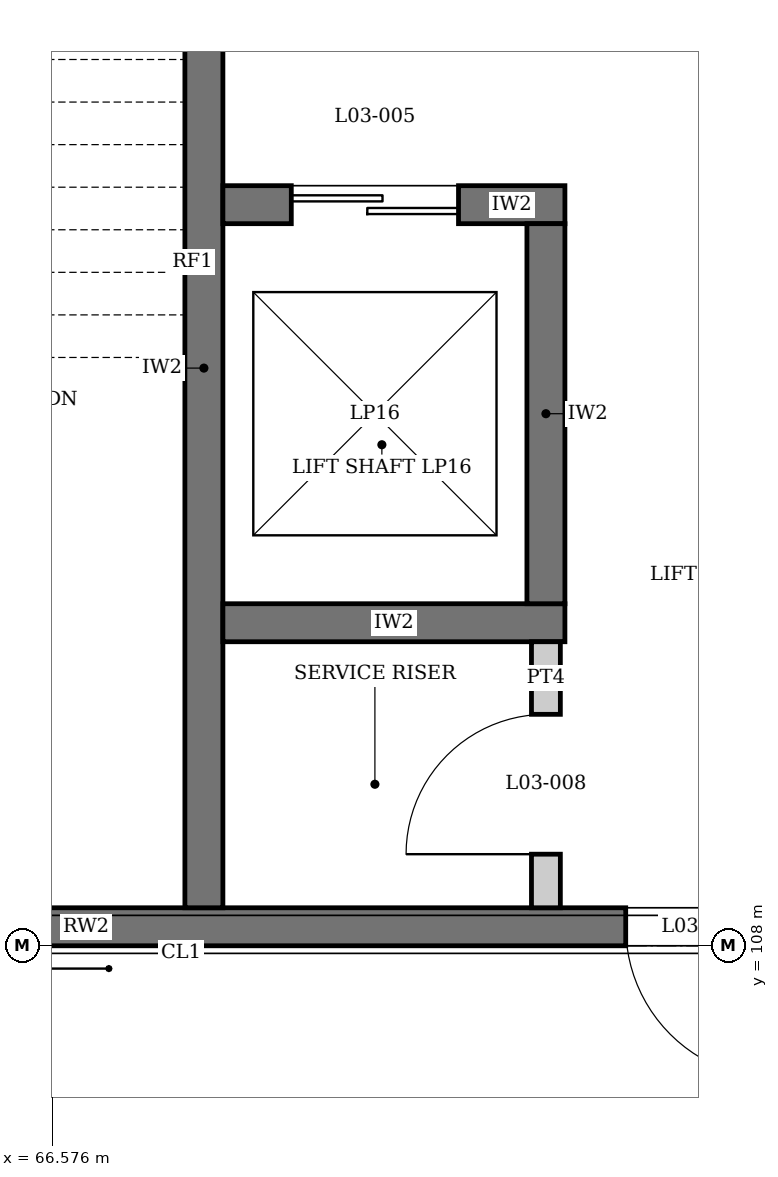
"""IFC4 building model, lengths in metres.
Left out: names, types, materials, properties, quantities, classifications, styles, units other than length and angle.
Written with IfcOpenShell. Run it as: python <this file> out.ifc"""

import sys

from ifc_helpers import new_model, si_unit, direction, frame, frame_2d, origin, place, context, subcontext, project, spatial, rectangle, extrude, element, fill, save


model = new_model("IFC4")
c1 = context("Model", 3, precision=1e-05, world=origin(), true_north=direction((0.0, 1.0)))
c2 = subcontext(c1, "Body", "Model", "MODEL_VIEW")
j1 = project(units=[si_unit("LENGTHUNIT", "METRE"), si_unit("PLANEANGLEUNIT", "RADIAN")], contexts=[c1])
p1 = place(None, origin())
s1 = spatial("IfcSite", under=j1, at=p1, CompositionType="ELEMENT")
p2 = place(p1, origin())
s2 = spatial("IfcBuilding", under=s1, at=p2, CompositionType="ELEMENT")
p3 = place(p2, frame((0.0, 0.0, 15.0)))
s3 = spatial("IfcBuildingStorey", under=s2, at=p3, CompositionType="ELEMENT", Elevation=15.0)
p4 = place(p3, frame((63.25, 108.125, 0.0), z_axis=(0.0, 0.0, 1.0), x_axis=(1.0, 0.0, 0.0)))
e1 = element("IfcWall", 1, at=p4, inside=s3, PredefinedType="SHEAR", context=c2, shape_type="SweptSolid", body=[
    extrude(rectangle(XDim=8.5, YDim=0.25, at=frame_2d((4.25, 0.0))), origin(), (0.0, 0.0, 1.0), 4.05),
])
p5 = place(p4, frame((7.1, 0.0, 0.0)))
e2 = element("IfcOpeningElement", 2, at=p5, cuts=e1, PredefinedType="OPENING", context=c2, shape_type="SweptSolid", body=[
    extrude(rectangle(XDim=1.0, YDim=2.1, at=frame_2d((0.5, 1.05))), frame((0.0, 0.135, 0.0), z_axis=(0.0, -1.0, 0.0), x_axis=(1.0, 0.0, 0.0)), (0.0, 0.0, 1.0), 0.27),
])
p6 = place(p3, frame((67.575, 116.75, 0.0), z_axis=(0.0, 0.0, 1.0), x_axis=(0.0, -1.0, 0.0)))
e3 = element("IfcWall", 3, at=p6, inside=s3, PredefinedType="SOLIDWALL", context=c2, shape_type="SweptSolid", body=[
    extrude(rectangle(XDim=8.5, YDim=0.25, at=frame_2d((4.25, 0.0))), origin(), (0.0, 0.0, 1.0), 3.95),
])
p7 = place(p6, frame((0.4, 0.0, 0.0)))
e4 = element("IfcOpeningElement", 4, at=p7, cuts=e3, PredefinedType="OPENING", context=c2, shape_type="SweptSolid", body=[
    extrude(rectangle(XDim=1.0, YDim=2.1, at=frame_2d((0.5, 1.05))), frame((0.0, 0.135, 0.0), z_axis=(0.0, -1.0, 0.0), x_axis=(1.0, 0.0, 0.0)), (0.0, 0.0, 1.0), 0.27),
])
p8 = place(p3, frame((67.7, 110.125, 0.0), z_axis=(0.0, 0.0, 1.0), x_axis=(1.0, 0.0, 0.0)))
e5 = element("IfcWall", 5, at=p8, inside=s3, PredefinedType="SOLIDWALL", context=c2, shape_type="SweptSolid", body=[
    extrude(rectangle(XDim=2.25, YDim=0.25, at=frame_2d((1.125, 0.0))), origin(), (0.0, 0.0, 1.0), 3.9),
])
p9 = place(p3, frame((67.7, 112.875, 0.0), z_axis=(0.0, 0.0, 1.0), x_axis=(1.0, 0.0, 0.0)))
e6 = element("IfcWall", 6, at=p9, inside=s3, PredefinedType="SOLIDWALL", context=c2, shape_type="SweptSolid", body=[
    extrude(rectangle(XDim=2.25, YDim=0.25, at=frame_2d((1.125, 0.0))), origin(), (0.0, 0.0, 1.0), 3.9),
])
p10 = place(p9, frame((0.45, 0.0, 0.0)))
e7 = element("IfcOpeningElement", 7, at=p10, cuts=e6, PredefinedType="OPENING", context=c2, shape_type="SweptSolid", body=[
    extrude(rectangle(XDim=1.1, YDim=2.1, at=frame_2d((0.55, 1.05))), frame((0.0, 0.135, 0.0), z_axis=(0.0, -1.0, 0.0), x_axis=(1.0, 0.0, 0.0)), (0.0, 0.0, 1.0), 0.27),
])
p11 = place(p3, frame((69.825, 110.25, 0.0), z_axis=(0.0, 0.0, 1.0), x_axis=(0.0, 1.0, 0.0)))
e8 = element("IfcWall", 8, at=p11, inside=s3, PredefinedType="SOLIDWALL", context=c2, shape_type="SweptSolid", body=[
    extrude(rectangle(XDim=2.5, YDim=0.25, at=frame_2d((1.25, 0.0))), origin(), (0.0, 0.0, 1.0), 3.9),
])
p12 = place(p3, frame((69.825, 108.25, 0.0), z_axis=(0.0, 0.0, 1.0), x_axis=(0.0, 1.0, 0.0)))
e9 = element("IfcWall", 9, at=p12, inside=s3, PredefinedType="PARTITIONING", context=c2, shape_type="SweptSolid", body=[
    extrude(rectangle(XDim=1.75, YDim=0.19, at=frame_2d((0.875, 0.0))), origin(), (0.0, 0.0, 1.0), 3.45),
])
p13 = place(p12, frame((0.353, 0.0, 0.0)))
e10 = element("IfcOpeningElement", 10, at=p13, cuts=e9, PredefinedType="OPENING", context=c2, shape_type="SweptSolid", body=[
    extrude(rectangle(XDim=0.92, YDim=2.1, at=frame_2d((0.46, 1.05))), frame((0.0, 0.105, 0.0), z_axis=(0.0, -1.0, 0.0), x_axis=(1.0, 0.0, 0.0)), (0.0, 0.0, 1.0), 0.21),
])
p14 = place(p5, frame((1.0, 0.0, 0.0), z_axis=(0.0, 0.0, 1.0), x_axis=(-1.0, 0.0, 0.0)))
e11 = element("IfcDoor", 11, at=p14, inside=s3, OperationType="SINGLE_SWING_LEFT", PredefinedType="DOOR", context=c2, shape_type="SweptSolid", body=[
    extrude(rectangle(XDim=1.0, YDim=2.1, at=frame_2d((0.5, 1.05))), frame((0.0, 0.025, 0.0), z_axis=(0.0, -1.0, 0.0), x_axis=(1.0, 0.0, 0.0)), (0.0, 0.0, 1.0), 0.05),
])
fill(e2, e11)
p15 = place(p10, origin())
e12 = element("IfcDoor", 12, at=p15, inside=s3, OperationType="DOUBLE_DOOR_SLIDING", PredefinedType="DOOR", context=c2, shape_type="SweptSolid", body=[
    extrude(rectangle(XDim=1.1, YDim=2.1, at=frame_2d((0.55, 1.05))), frame((0.0, 0.025, 0.0), z_axis=(0.0, -1.0, 0.0), x_axis=(1.0, 0.0, 0.0)), (0.0, 0.0, 1.0), 0.05),
])
fill(e7, e12)
p16 = place(p13, origin())
e13 = element("IfcDoor", 13, at=p16, inside=s3, OperationType="SINGLE_SWING_LEFT", PredefinedType="DOOR", context=c2, shape_type="SweptSolid", body=[
    extrude(rectangle(XDim=0.92, YDim=2.1, at=frame_2d((0.46, 1.05))), frame((0.0, 0.025, 0.0), z_axis=(0.0, -1.0, 0.0), x_axis=(1.0, 0.0, 0.0)), (0.0, 0.0, 1.0), 0.05),
])
fill(e10, e13)
save(model, sys.argv[1])
